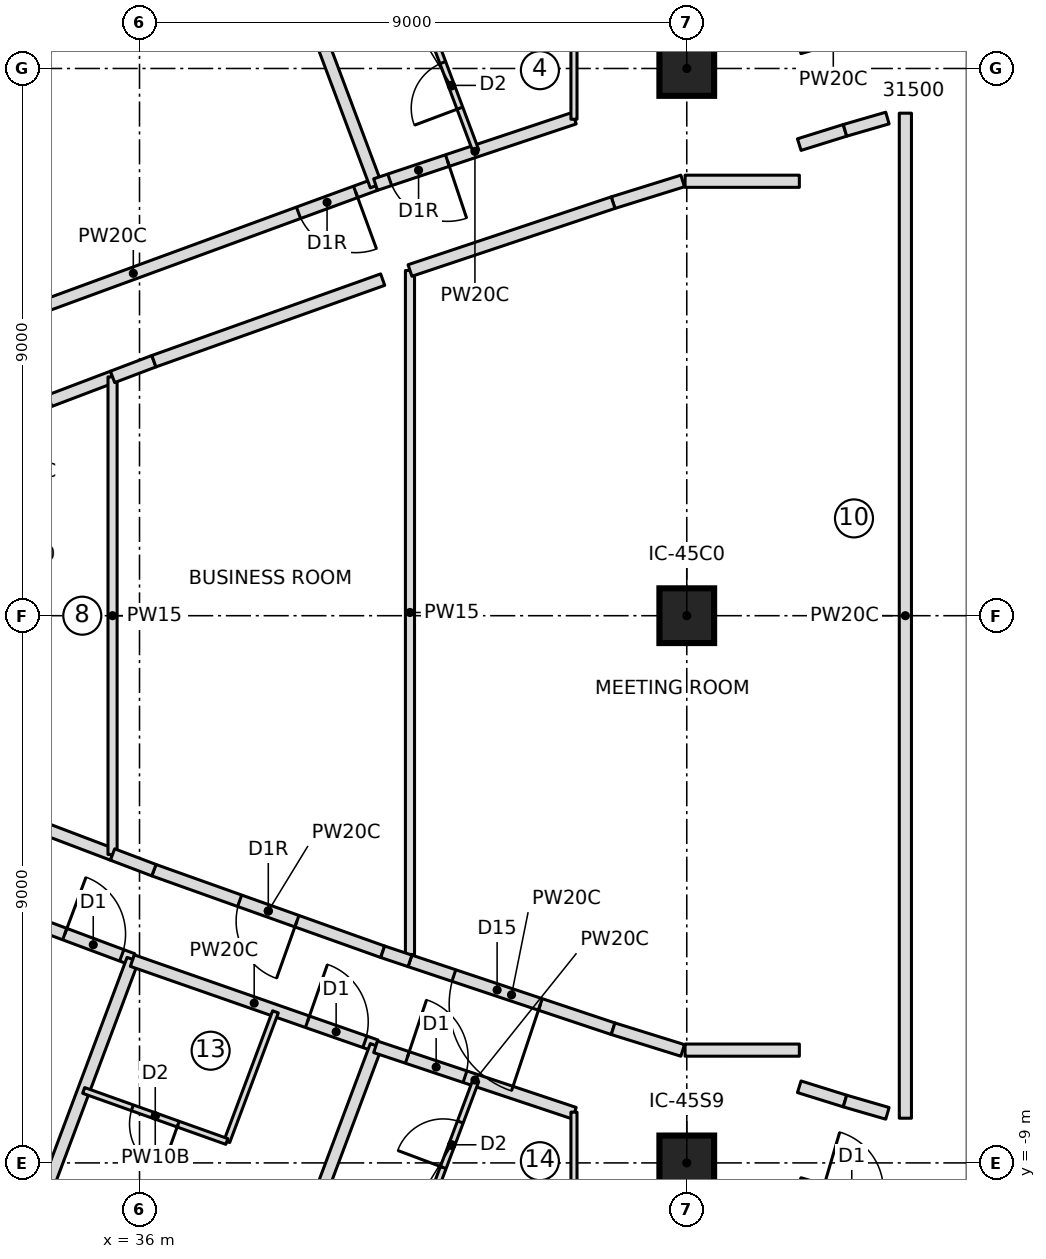
"""IFC4 building model, lengths in metres.
Left out: names, types, materials, properties, quantities, classifications, styles, units other than length and angle.
Written with IfcOpenShell. Run it as: python <this file> out.ifc"""

import sys

from ifc_helpers import new_model, si_unit, direction, frame, frame_2d, origin, origin_2d, place, context, subcontext, project, spatial, rectangle, extrude, element, fill, save


model = new_model("IFC4")
c1 = context("Model", 3, precision=1e-05, world=origin(), true_north=direction((0.0, 1.0)))
c2 = subcontext(c1, "Body", "Model", "MODEL_VIEW")
j1 = project(units=[si_unit("LENGTHUNIT", "METRE"), si_unit("PLANEANGLEUNIT", "RADIAN")], contexts=[c1])
p1 = place(None, origin())
s1 = spatial("IfcSite", under=j1, at=p1, CompositionType="ELEMENT")
p2 = place(p1, origin())
s2 = spatial("IfcBuilding", under=s1, at=p2, CompositionType="ELEMENT")
p3 = place(p2, frame((0.0, 0.0, 220.8)))
s3 = spatial("IfcBuildingStorey", under=s2, at=p3, CompositionType="ELEMENT", Elevation=220.8)
for number, where, z_axis, x_axis in (
    (1, (45.0, -9.0, 0.0), (0.0, 0.0, 1.0), (1.0, 0.0, 0.0)),
    (2, (45.0, 0.0, 0.0), (0.0, 0.0, 1.0), (1.0, 0.0, 0.0)),
    (3, (45.0, 9.0, 0.0), (0.0, 0.0, 1.0), (1.0, 0.0, 0.0)),
):
    element("IfcColumn", number, at=place(p3, frame(where, z_axis=z_axis, x_axis=x_axis)), inside=s3, PredefinedType="COLUMN", context=c2, shape_type="SweptSolid", body=[
        extrude(rectangle(XDim=0.9, YDim=0.9, at=origin_2d()), origin(), (0.0, 0.0, 1.0), 3.55),
    ])
p4 = place(p3, frame((39.882, 7.091, 0.0), z_axis=(0.0, 0.0, 1.0), x_axis=(-0.938916907106, -0.344143925634, 0.0)))
e4 = element("IfcWall", 4, at=p4, inside=s3, PredefinedType="PARTITIONING", context=c2, shape_type="SweptSolid", body=[
    extrude(rectangle(XDim=8.488, YDim=0.2, at=frame_2d((4.244, 0.0))), origin(), (0.0, 0.0, 1.0), 3.25),
])
p5 = place(p4, frame((0.35, 0.0, 0.0)))
e5 = element("IfcOpeningElement", 5, at=p5, cuts=e4, PredefinedType="OPENING", context=c2, shape_type="SweptSolid", body=[
    extrude(rectangle(XDim=1.0, YDim=2.1, at=frame_2d((0.5, 1.05))), frame((0.0, 0.11, 0.0), z_axis=(0.0, -1.0, 0.0), x_axis=(1.0, 0.0, 0.0)), (0.0, 0.0, 1.0), 0.22),
])
p6 = place(p3, frame((39.889, 7.072, 0.0), z_axis=(0.0, 0.0, 1.0), x_axis=(-0.35112895446, 0.936327110224, 0.0)))
e6 = element("IfcWall", 6, at=p6, inside=s3, PredefinedType="PARTITIONING", context=c2, shape_type="SweptSolid", body=[
    extrude(rectangle(XDim=9.706, YDim=0.2, at=frame_2d((4.853, 0.0))), origin(), (0.0, 0.0, 1.0), 3.25),
])
p7 = place(p3, frame((43.15, 8.183, 0.0), z_axis=(0.0, 0.0, 1.0), x_axis=(-0.948477584784, -0.316844238013, 0.0)))
e7 = element("IfcWall", 7, at=p7, inside=s3, PredefinedType="PARTITIONING", context=c2, shape_type="SweptSolid", body=[
    extrude(rectangle(XDim=3.445, YDim=0.2, at=frame_2d((1.723, 0.0))), origin(), (0.0, 0.0, 1.0), 3.25),
])
p8 = place(p7, frame((2.2, 0.0, 0.0)))
e8 = element("IfcOpeningElement", 8, at=p8, cuts=e7, PredefinedType="OPENING", context=c2, shape_type="SweptSolid", body=[
    extrude(rectangle(XDim=1.0, YDim=2.1, at=frame_2d((0.5, 1.05))), frame((0.0, 0.11, 0.0), z_axis=(0.0, -1.0, 0.0), x_axis=(1.0, 0.0, 0.0)), (0.0, 0.0, 1.0), 0.22),
])
p9 = place(p3, frame((41.532, 7.645, 0.0), z_axis=(0.0, 0.0, 1.0), x_axis=(-0.351146927505, 0.936320370014, 0.0)))
e9 = element("IfcWall", 9, at=p9, inside=s3, PredefinedType="PARTITIONING", context=c2, shape_type="SweptSolid", body=[
    extrude(rectangle(XDim=2.278, YDim=0.1, at=frame_2d((1.139, 0.0))), origin(), (0.0, 0.0, 1.0), 3.25),
])
p10 = place(p9, frame((0.75, 0.0, 0.0)))
e10 = element("IfcOpeningElement", 10, at=p10, cuts=e9, PredefinedType="OPENING", context=c2, shape_type="SweptSolid", body=[
    extrude(rectangle(XDim=0.8, YDim=2.1, at=frame_2d((0.4, 1.05))), frame((0.0, 0.06, 0.0), z_axis=(0.0, -1.0, 0.0), x_axis=(1.0, 0.0, 0.0)), (0.0, 0.0, 1.0), 0.12),
])
p11 = place(p3, frame((47.969, 9.671, 0.0), z_axis=(0.0, 0.0, 1.0), x_axis=(-0.958867721668, -0.283853293696, 0.0)))
e11 = element("IfcWall", 11, at=p11, inside=s3, PredefinedType="PARTITIONING", context=c2, shape_type="SweptSolid", body=[
    extrude(rectangle(XDim=1.167, YDim=0.2, at=frame_2d((0.583, 0.0))), origin(), (0.0, 0.0, 1.0), 3.25),
])
p12 = place(p3, frame((31.913, -4.17, 0.0), z_axis=(0.0, 0.0, 1.0), x_axis=(0.936848300955, -0.349735987565, 0.0)))
e12 = element("IfcWall", 12, at=p12, inside=s3, PredefinedType="PARTITIONING", context=c2, shape_type="SweptSolid", body=[
    extrude(rectangle(XDim=4.244, YDim=0.2, at=frame_2d((2.122, 0.0))), origin(), (0.0, 0.0, 1.0), 3.25),
])
p13 = place(p12, frame((3.05, 0.0, 0.0)))
e13 = element("IfcOpeningElement", 13, at=p13, cuts=e12, PredefinedType="OPENING", context=c2, shape_type="SweptSolid", body=[
    extrude(rectangle(XDim=1.0, YDim=2.1, at=frame_2d((0.5, 1.05))), frame((0.0, 0.11, 0.0), z_axis=(0.0, -1.0, 0.0), x_axis=(1.0, 0.0, 0.0)), (0.0, 0.0, 1.0), 0.22),
])
p14 = place(p3, frame((32.483, -14.738, 0.0), z_axis=(0.0, 0.0, 1.0), x_axis=(0.351117925717, 0.936331246002, 0.0)))
e14 = element("IfcWall", 14, at=p14, inside=s3, PredefinedType="PARTITIONING", context=c2, shape_type="SweptSolid", body=[
    extrude(rectangle(XDim=9.701, YDim=0.2, at=frame_2d((4.851, 0.0))), origin(), (0.0, 0.0, 1.0), 3.25),
])
p15 = place(p3, frame((35.882, -5.673, 0.0), z_axis=(0.0, 0.0, 1.0), x_axis=(0.944107376821, -0.329638075823, 0.0)))
e15 = element("IfcWall", 15, at=p15, inside=s3, PredefinedType="PARTITIONING", context=c2, shape_type="SweptSolid", body=[
    extrude(rectangle(XDim=4.245, YDim=0.2, at=frame_2d((2.122, 0.0))), origin(), (0.0, 0.0, 1.0), 3.25),
])
p16 = place(p15, frame((3.05, 0.0, 0.0)))
e16 = element("IfcOpeningElement", 16, at=p16, cuts=e15, PredefinedType="OPENING", context=c2, shape_type="SweptSolid", body=[
    extrude(rectangle(XDim=1.0, YDim=2.1, at=frame_2d((0.5, 1.05))), frame((0.0, 0.11, 0.0), z_axis=(0.0, -1.0, 0.0), x_axis=(1.0, 0.0, 0.0)), (0.0, 0.0, 1.0), 0.22),
])
p17 = place(p3, frame((38.236, -6.516, 0.0), z_axis=(0.0, 0.0, 1.0), x_axis=(-0.351229183496, -0.936289517543, 0.0)))
e17 = element("IfcWall", 17, at=p17, inside=s3, PredefinedType="PARTITIONING", context=c2, shape_type="SweptSolid", body=[
    extrude(rectangle(XDim=2.277, YDim=0.1, at=frame_2d((1.139, 0.0))), origin(), (0.0, 0.0, 1.0), 3.25),
])
p18 = place(p3, frame((37.436, -8.648, 0.0), z_axis=(0.0, 0.0, 1.0), x_axis=(-0.941896455552, 0.335903359641, 0.0)))
e18 = element("IfcWall", 18, at=p18, inside=s3, PredefinedType="PARTITIONING", context=c2, shape_type="SweptSolid", body=[
    extrude(rectangle(XDim=2.5, YDim=0.1, at=frame_2d((1.25, 0.0))), origin(), (0.0, 0.0, 1.0), 3.25),
])
p19 = place(p18, frame((0.85, 0.0, 0.0)))
e19 = element("IfcOpeningElement", 19, at=p19, cuts=e18, PredefinedType="OPENING", context=c2, shape_type="SweptSolid", body=[
    extrude(rectangle(XDim=0.8, YDim=2.1, at=frame_2d((0.4, 1.05))), frame((0.0, 0.06, 0.0), z_axis=(0.0, -1.0, 0.0), x_axis=(1.0, 0.0, 0.0)), (0.0, 0.0, 1.0), 0.12),
])
p20 = place(p3, frame((36.481, -16.161, 0.0), z_axis=(0.0, 0.0, 1.0), x_axis=(0.35112895446, 0.936327110224, 0.0)))
e20 = element("IfcWall", 20, at=p20, inside=s3, PredefinedType="PARTITIONING", context=c2, shape_type="SweptSolid", body=[
    extrude(rectangle(XDim=9.706, YDim=0.2, at=frame_2d((4.853, 0.0))), origin(), (0.0, 0.0, 1.0), 3.25),
])
p21 = place(p3, frame((39.882, -7.091, 0.0), z_axis=(0.0, 0.0, 1.0), x_axis=(0.948477584784, -0.316844238013, 0.0)))
e21 = element("IfcWall", 21, at=p21, inside=s3, PredefinedType="PARTITIONING", context=c2, shape_type="SweptSolid", body=[
    extrude(rectangle(XDim=3.445, YDim=0.2, at=frame_2d((1.723, 0.0))), origin(), (0.0, 0.0, 1.0), 3.25),
])
p22 = place(p21, frame((0.55, 0.0, 0.0)))
e22 = element("IfcOpeningElement", 22, at=p22, cuts=e21, PredefinedType="OPENING", context=c2, shape_type="SweptSolid", body=[
    extrude(rectangle(XDim=1.0, YDim=2.1, at=frame_2d((0.5, 1.05))), frame((0.0, 0.11, 0.0), z_axis=(0.0, -1.0, 0.0), x_axis=(1.0, 0.0, 0.0)), (0.0, 0.0, 1.0), 0.22),
])
p23 = place(p3, frame((40.732, -9.779, 0.0), z_axis=(0.0, 0.0, 1.0), x_axis=(0.351146927505, 0.936320370014, 0.0)))
e23 = element("IfcWall", 23, at=p23, inside=s3, PredefinedType="PARTITIONING", context=c2, shape_type="SweptSolid", body=[
    extrude(rectangle(XDim=2.278, YDim=0.1, at=frame_2d((1.139, 0.0))), origin(), (0.0, 0.0, 1.0), 3.25),
])
p24 = place(p23, frame((0.75, 0.0, 0.0)))
e24 = element("IfcOpeningElement", 24, at=p24, cuts=e23, PredefinedType="OPENING", context=c2, shape_type="SweptSolid", body=[
    extrude(rectangle(XDim=0.8, YDim=2.1, at=frame_2d((0.4, 1.05))), frame((0.0, 0.06, 0.0), z_axis=(0.0, -1.0, 0.0), x_axis=(1.0, 0.0, 0.0)), (0.0, 0.0, 1.0), 0.12),
])
p25 = place(p3, frame((32.556, 2.789, 0.0), z_axis=(0.0, 0.0, 1.0), x_axis=(0.934971422854, 0.354723044706, 0.0)))
e25 = element("IfcWall", 25, at=p25, inside=s3, PredefinedType="PARTITIONING", context=c2, shape_type="SweptSolid", body=[
    extrude(rectangle(XDim=3.209, YDim=0.2, at=frame_2d((1.604, 0.0))), origin(), (0.0, 0.0, 1.0), 3.25),
])
p26 = place(p25, frame((1.104, 0.0, 0.0)))
e26 = element("IfcOpeningElement", 26, at=p26, cuts=e25, PredefinedType="OPENING", context=c2, shape_type="SweptSolid", body=[
    extrude(rectangle(XDim=1.0, YDim=2.1, at=frame_2d((0.5, 1.05))), frame((0.0, 0.11, 0.0), z_axis=(0.0, -1.0, 0.0), x_axis=(1.0, 0.0, 0.0)), (0.0, 0.0, 1.0), 0.22),
])
p27 = place(p3, frame((35.556, -3.927, 0.0), z_axis=(0.0, 0.0, 1.0), x_axis=(-0.934971422854, 0.354723044706, 0.0)))
e27 = element("IfcWall", 27, at=p27, inside=s3, PredefinedType="PARTITIONING", context=c2, shape_type="SweptSolid", body=[
    extrude(rectangle(XDim=3.209, YDim=0.2, at=frame_2d((1.604, 0.0))), origin(), (0.0, 0.0, 1.0), 3.25),
])
p28 = place(p3, frame((35.556, -3.927, 0.0), z_axis=(0.0, 0.0, 1.0), x_axis=(0.0, 1.0, 0.0)))
e28 = element("IfcWall", 28, at=p28, inside=s3, PredefinedType="PARTITIONING", context=c2, shape_type="SweptSolid", body=[
    extrude(rectangle(XDim=7.855, YDim=0.15, at=frame_2d((3.927, 0.0))), origin(), (0.0, 0.0, 1.0), 3.25),
])
p29 = place(p3, frame((39.999, -5.527, 0.0), z_axis=(0.0, 0.0, 1.0), x_axis=(-0.941909090846, 0.335867927288, 0.0)))
e29 = element("IfcWall", 29, at=p29, inside=s3, PredefinedType="PARTITIONING", context=c2, shape_type="SweptSolid", body=[
    extrude(rectangle(XDim=3.995, YDim=0.2, at=frame_2d((1.998, 0.0))), origin(), (0.0, 0.0, 1.0), 3.25),
])
p30 = place(p29, frame((1.498, 0.0, 0.0)))
e30 = element("IfcOpeningElement", 30, at=p30, cuts=e29, PredefinedType="OPENING", context=c2, shape_type="SweptSolid", body=[
    extrude(rectangle(XDim=1.0, YDim=2.1, at=frame_2d((0.5, 1.05))), frame((0.0, 0.11, 0.0), z_axis=(0.0, -1.0, 0.0), x_axis=(1.0, 0.0, 0.0)), (0.0, 0.0, 1.0), 0.22),
])
for number, where, z_axis, x_axis in (
    (31, (36.236, -4.186, 0.0), (0.0, 0.0, 1.0), (-0.935, 0.355, 0.0)),
    (32, (35.556, 3.927, 0.0), (0.0, 0.0, 1.0), (0.935, 0.355, 0.0)),
):
    element("IfcWall", number, at=place(p3, frame(where, z_axis=z_axis, x_axis=x_axis)), inside=s3, PredefinedType="PARTITIONING", context=c2, shape_type="SweptSolid", body=[
        extrude(rectangle(XDim=0.727, YDim=0.2, at=frame_2d((0.364, 0.0))), origin(), (0.0, 0.0, 1.0), 3.25),
    ])
p31 = place(p3, frame((36.236, 4.186, 0.0), z_axis=(0.0, 0.0, 1.0), x_axis=(0.941909090846, 0.335867927288, 0.0)))
e33 = element("IfcWall", 33, at=p31, inside=s3, PredefinedType="PARTITIONING", context=c2, shape_type="SweptSolid", body=[
    extrude(rectangle(XDim=3.995, YDim=0.2, at=frame_2d((1.998, 0.0))), origin(), (0.0, 0.0, 1.0), 3.25),
])
p32 = place(p3, frame((40.448, -5.572, 0.0), z_axis=(0.0, 0.0, 1.0), x_axis=(0.0, 1.0, 0.0)))
e34 = element("IfcWall", 34, at=p32, inside=s3, PredefinedType="PARTITIONING", context=c2, shape_type="SweptSolid", body=[
    extrude(rectangle(XDim=11.249, YDim=0.15, at=frame_2d((5.625, 0.0))), origin(), (0.0, 0.0, 1.0), 3.25),
])
p33 = place(p3, frame((43.788, -6.793, 0.0), z_axis=(0.0, 0.0, 1.0), x_axis=(-0.948475139593, 0.316851557632, 0.0)))
e35 = element("IfcWall", 35, at=p33, inside=s3, PredefinedType="PARTITIONING", context=c2, shape_type="SweptSolid", body=[
    extrude(rectangle(XDim=3.522, YDim=0.2, at=frame_2d((1.761, 0.0))), origin(), (0.0, 0.0, 1.0), 3.25),
])
p34 = place(p33, frame((1.261, 0.0, 0.0)))
e36 = element("IfcOpeningElement", 36, at=p34, cuts=e35, PredefinedType="OPENING", context=c2, shape_type="SweptSolid", body=[
    extrude(rectangle(XDim=1.5, YDim=2.1, at=frame_2d((0.75, 1.05))), frame((0.0, 0.11, 0.0), z_axis=(0.0, -1.0, 0.0), x_axis=(1.0, 0.0, 0.0)), (0.0, 0.0, 1.0), 0.22),
])
p35 = place(p3, frame((43.788, 6.793, 0.0), z_axis=(0.0, 0.0, 1.0), x_axis=(0.954693570678, 0.29759063511, 0.0)))
e37 = element("IfcWall", 37, at=p35, inside=s3, PredefinedType="PARTITIONING", context=c2, shape_type="SweptSolid", body=[
    extrude(rectangle(XDim=1.198, YDim=0.2, at=frame_2d((0.599, 0.0))), origin(), (0.0, 0.0, 1.0), 3.25),
])
for number, where, z_axis, x_axis in (
    (38, (46.85, 7.748, 0.0), (0.0, 0.0, 1.0), (0.955, 0.298, 0.0)),
    (39, (47.602, -7.982, 0.0), (0.0, 0.0, 1.0), (-0.955, 0.298, 0.0)),
):
    element("IfcWall", number, at=place(p3, frame(where, z_axis=z_axis, x_axis=x_axis)), inside=s3, PredefinedType="PARTITIONING", context=c2, shape_type="SweptSolid", body=[
        extrude(rectangle(XDim=0.788, YDim=0.2, at=frame_2d((0.394, 0.0))), origin(), (0.0, 0.0, 1.0), 3.25),
    ])
p36 = place(p3, frame((44.933, -7.15, 0.0), z_axis=(0.0, 0.0, 1.0), x_axis=(-0.954693570678, 0.29759063511, 0.0)))
e40 = element("IfcWall", 40, at=p36, inside=s3, PredefinedType="PARTITIONING", context=c2, shape_type="SweptSolid", body=[
    extrude(rectangle(XDim=1.198, YDim=0.2, at=frame_2d((0.599, 0.0))), origin(), (0.0, 0.0, 1.0), 3.25),
])
p37 = place(p3, frame((40.448, 5.677, 0.0), z_axis=(0.0, 0.0, 1.0), x_axis=(0.948475139593, 0.316851557632, 0.0)))
e41 = element("IfcWall", 41, at=p37, inside=s3, PredefinedType="PARTITIONING", context=c2, shape_type="SweptSolid", body=[
    extrude(rectangle(XDim=3.522, YDim=0.2, at=frame_2d((1.761, 0.0))), origin(), (0.0, 0.0, 1.0), 3.25),
])
for number, where, z_axis, x_axis in (
    (42, (43.145, 10.463, 0.0), (0.0, 0.0, 1.0), (0.0, -1.0, 0.0)),
    (43, (43.145, -8.165, 0.0), (0.0, 0.0, 1.0), (0.0, -1.0, 0.0)),
):
    element("IfcWall", number, at=place(p3, frame(where, z_axis=z_axis, x_axis=x_axis)), inside=s3, PredefinedType="PARTITIONING", context=c2, shape_type="SweptSolid", body=[
        extrude(rectangle(XDim=2.298, YDim=0.1, at=frame_2d((1.149, 0.0))), origin(), (0.0, 0.0, 1.0), 3.25),
    ])
p38 = place(p3, frame((46.85, -9.34, 0.0), z_axis=(0.0, 0.0, 1.0), x_axis=(0.95944263903, -0.281903924079, 0.0)))
e44 = element("IfcWall", 44, at=p38, inside=s3, PredefinedType="PARTITIONING", context=c2, shape_type="SweptSolid", body=[
    extrude(rectangle(XDim=1.511, YDim=0.2, at=frame_2d((0.756, 0.0))), origin(), (0.0, 0.0, 1.0), 3.25),
])
p39 = place(p38, frame((0.4, 0.0, 0.0)))
e45 = element("IfcOpeningElement", 45, at=p39, cuts=e44, PredefinedType="OPENING", context=c2, shape_type="SweptSolid", body=[
    extrude(rectangle(XDim=1.0, YDim=2.1, at=frame_2d((0.5, 1.05))), frame((0.0, 0.11, 0.0), z_axis=(0.0, -1.0, 0.0), x_axis=(1.0, 0.0, 0.0)), (0.0, 0.0, 1.0), 0.22),
])
for number, where, z_axis, x_axis in (
    (46, (47.602, 7.982, 0.0), (0.0, 0.0, 1.0), (0.96, 0.278, 0.0)),
    (47, (48.3, -8.185, 0.0), (0.0, 0.0, 1.0), (-0.96, 0.278, 0.0)),
):
    element("IfcWall", number, at=place(p3, frame(where, z_axis=z_axis, x_axis=x_axis)), inside=s3, PredefinedType="PARTITIONING", context=c2, shape_type="SweptSolid", body=[
        extrude(rectangle(XDim=0.727, YDim=0.2, at=frame_2d((0.363, 0.0))), origin(), (0.0, 0.0, 1.0), 3.25),
    ])
p40 = place(p3, frame((44.972, 7.145, 0.0), z_axis=(0.0, 0.0, 1.0), x_axis=(0.99999999156, 0.000129920747, 0.0)))
e48 = element("IfcWall", 48, at=p40, inside=s3, PredefinedType="PARTITIONING", context=c2, shape_type="SweptSolid", body=[
    extrude(rectangle(XDim=1.879, YDim=0.2, at=frame_2d((0.939, 0.0))), origin(), (0.0, 0.0, 1.0), 3.25),
])
p41 = place(p3, frame((48.595, 8.265, 0.0), z_axis=(0.0, 0.0, 1.0), x_axis=(0.0, -1.0, 0.0)))
e49 = element("IfcWall", 49, at=p41, inside=s3, PredefinedType="PARTITIONING", context=c2, shape_type="SweptSolid", body=[
    extrude(rectangle(XDim=16.53, YDim=0.2, at=frame_2d((8.265, 0.0))), origin(), (0.0, 0.0, 1.0), 3.25),
])
p42 = place(p3, frame((46.852, -7.145, 0.0), z_axis=(0.0, 0.0, 1.0), x_axis=(-0.99999999156, 0.000129920747, 0.0)))
e50 = element("IfcWall", 50, at=p42, inside=s3, PredefinedType="PARTITIONING", context=c2, shape_type="SweptSolid", body=[
    extrude(rectangle(XDim=1.879, YDim=0.2, at=frame_2d((0.939, 0.0))), origin(), (0.0, 0.0, 1.0), 3.25),
])
p43 = place(p3, frame((40.448, -5.677, 0.0), z_axis=(0.0, 0.0, 1.0), x_axis=(-0.948424836926, 0.317002095739, 0.0)))
e51 = element("IfcWall", 51, at=p43, inside=s3, PredefinedType="PARTITIONING", context=c2, shape_type="SweptSolid", body=[
    extrude(rectangle(XDim=0.473, YDim=0.2, at=frame_2d((0.236, 0.0))), origin(), (0.0, 0.0, 1.0), 3.25),
])
p44 = place(p5, origin())
e52 = element("IfcDoor", 52, at=p44, inside=s3, OperationType="SINGLE_SWING_RIGHT", PredefinedType="DOOR", context=c2, shape_type="SweptSolid", body=[
    extrude(rectangle(XDim=1.0, YDim=2.1, at=frame_2d((0.5, 1.05))), frame((0.0, 0.025, 0.0), z_axis=(0.0, -1.0, 0.0), x_axis=(1.0, 0.0, 0.0)), (0.0, 0.0, 1.0), 0.05),
])
fill(e5, e52)
p45 = place(p10, origin())
e53 = element("IfcDoor", 53, at=p45, inside=s3, OperationType="SINGLE_SWING_LEFT", PredefinedType="DOOR", context=c2, shape_type="SweptSolid", body=[
    extrude(rectangle(XDim=0.8, YDim=2.1, at=frame_2d((0.4, 1.05))), frame((0.0, 0.025, 0.0), z_axis=(0.0, -1.0, 0.0), x_axis=(1.0, 0.0, 0.0)), (0.0, 0.0, 1.0), 0.05),
])
fill(e10, e53)
p46 = place(p8, origin())
e54 = element("IfcDoor", 54, at=p46, inside=s3, OperationType="SINGLE_SWING_RIGHT", PredefinedType="DOOR", context=c2, shape_type="SweptSolid", body=[
    extrude(rectangle(XDim=1.0, YDim=2.1, at=frame_2d((0.5, 1.05))), frame((0.0, 0.025, 0.0), z_axis=(0.0, -1.0, 0.0), x_axis=(1.0, 0.0, 0.0)), (0.0, 0.0, 1.0), 0.05),
])
fill(e8, e54)
p47 = place(p13, origin())
e55 = element("IfcDoor", 55, at=p47, inside=s3, OperationType="SINGLE_SWING_LEFT", PredefinedType="DOOR", context=c2, shape_type="SweptSolid", body=[
    extrude(rectangle(XDim=1.0, YDim=2.1, at=frame_2d((0.5, 1.05))), frame((0.0, 0.025, 0.0), z_axis=(0.0, -1.0, 0.0), x_axis=(1.0, 0.0, 0.0)), (0.0, 0.0, 1.0), 0.05),
])
fill(e13, e55)
p48 = place(p19, origin())
e56 = element("IfcDoor", 56, at=p48, inside=s3, OperationType="SINGLE_SWING_LEFT", PredefinedType="DOOR", context=c2, shape_type="SweptSolid", body=[
    extrude(rectangle(XDim=0.8, YDim=2.1, at=frame_2d((0.4, 1.05))), frame((0.0, 0.025, 0.0), z_axis=(0.0, -1.0, 0.0), x_axis=(1.0, 0.0, 0.0)), (0.0, 0.0, 1.0), 0.05),
])
fill(e19, e56)
p49 = place(p16, origin())
e57 = element("IfcDoor", 57, at=p49, inside=s3, OperationType="SINGLE_SWING_LEFT", PredefinedType="DOOR", context=c2, shape_type="SweptSolid", body=[
    extrude(rectangle(XDim=1.0, YDim=2.1, at=frame_2d((0.5, 1.05))), frame((0.0, 0.025, 0.0), z_axis=(0.0, -1.0, 0.0), x_axis=(1.0, 0.0, 0.0)), (0.0, 0.0, 1.0), 0.05),
])
fill(e16, e57)
p50 = place(p24, origin())
e58 = element("IfcDoor", 58, at=p50, inside=s3, OperationType="SINGLE_SWING_LEFT", PredefinedType="DOOR", context=c2, shape_type="SweptSolid", body=[
    extrude(rectangle(XDim=0.8, YDim=2.1, at=frame_2d((0.4, 1.05))), frame((0.0, 0.025, 0.0), z_axis=(0.0, -1.0, 0.0), x_axis=(1.0, 0.0, 0.0)), (0.0, 0.0, 1.0), 0.05),
])
fill(e24, e58)
p51 = place(p22, origin())
e59 = element("IfcDoor", 59, at=p51, inside=s3, OperationType="SINGLE_SWING_LEFT", PredefinedType="DOOR", context=c2, shape_type="SweptSolid", body=[
    extrude(rectangle(XDim=1.0, YDim=2.1, at=frame_2d((0.5, 1.05))), frame((0.0, 0.025, 0.0), z_axis=(0.0, -1.0, 0.0), x_axis=(1.0, 0.0, 0.0)), (0.0, 0.0, 1.0), 0.05),
])
fill(e22, e59)
p52 = place(p30, origin())
e60 = element("IfcDoor", 60, at=p52, inside=s3, OperationType="SINGLE_SWING_RIGHT", PredefinedType="DOOR", context=c2, shape_type="SweptSolid", body=[
    extrude(rectangle(XDim=1.0, YDim=2.1, at=frame_2d((0.5, 1.05))), frame((0.0, 0.025, 0.0), z_axis=(0.0, -1.0, 0.0), x_axis=(1.0, 0.0, 0.0)), (0.0, 0.0, 1.0), 0.05),
])
fill(e30, e60)
p53 = place(p34, origin())
e61 = element("IfcDoor", 61, at=p53, inside=s3, OperationType="DOUBLE_DOOR_SINGLE_SWING", PredefinedType="DOOR", context=c2, shape_type="SweptSolid", body=[
    extrude(rectangle(XDim=1.5, YDim=2.1, at=frame_2d((0.75, 1.05))), frame((0.0, 0.025, 0.0), z_axis=(0.0, -1.0, 0.0), x_axis=(1.0, 0.0, 0.0)), (0.0, 0.0, 1.0), 0.05),
])
fill(e36, e61)
save(model, sys.argv[1])
